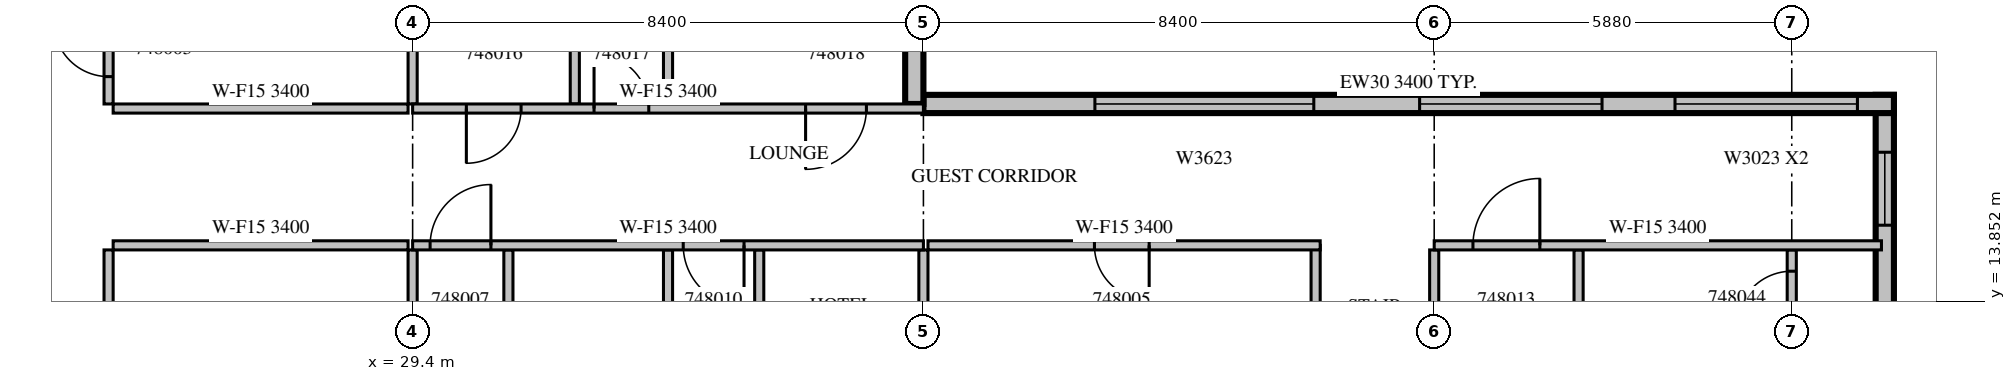
"""IFC4 building model, lengths in metres.
Left out: names, types, materials, properties, quantities, classifications, styles, units other than length and angle.
Written with IfcOpenShell. Run it as: python <this file> out.ifc"""

import sys

from ifc_helpers import new_model, si_unit, direction, frame, frame_2d, origin, place, context, subcontext, project, spatial, rectangle, extrude, source, transform, mapped, element, fill, save


model = new_model("IFC4")
c1 = context("Model", 3, precision=1e-05, world=origin(), true_north=direction((0.0, 1.0)))
c2 = subcontext(c1, "Body", "Model", "MODEL_VIEW")
j1 = project(units=[si_unit("LENGTHUNIT", "METRE"), si_unit("PLANEANGLEUNIT", "RADIAN")], contexts=[c1])
p1 = place(None, origin())
s1 = spatial("IfcSite", under=j1, at=p1, CompositionType="ELEMENT")
p2 = place(p1, origin())
s2 = spatial("IfcBuilding", under=s1, at=p2, CompositionType="ELEMENT")
p3 = place(p2, frame((0.0, 0.0, 215.8)))
s3 = spatial("IfcBuildingStorey", under=s2, at=p3, CompositionType="ELEMENT", Elevation=215.8)
m1 = source(origin(), c2, "Body", "SweptSolid", [
    extrude(rectangle(XDim=6.75, YDim=0.3, at=frame_2d((3.375, 0.0))), origin(), (0.0, 0.0, 1.0), 3.4),
])
p4 = place(p3, frame((53.61, 10.5, 0.0), z_axis=(0.0, 0.0, 1.0), x_axis=(0.0, 1.0, 0.0)))
e1 = element("IfcWall", 1, at=p4, inside=s3, PredefinedType="STANDARD", context=c2, shape_type="MappedRepresentation", body=[
    mapped(m1, transform((0.0, 0.0, 0.0), scale=1.0)),
])
m2 = source(origin(), c2, "Body", "SweptSolid", [
    extrude(rectangle(XDim=1.2, YDim=2.3, at=frame_2d((0.6, 1.15))), frame((0.0, 0.16, 0.0), z_axis=(0.0, -1.0, 0.0), x_axis=(1.0, 0.0, 0.0)), (0.0, 0.0, 1.0), 0.32),
])
p5 = place(p4, frame((1.087, 0.0, 0.6)))
e2 = element("IfcOpeningElement", 2, at=p5, cuts=e1, PredefinedType="OPENING", context=c2, shape_type="MappedRepresentation", body=[
    mapped(m2, transform((0.0, 0.0, 0.0), scale=1.0)),
])
p6 = place(p4, frame((4.606, 0.0, 0.6)))
e3 = element("IfcOpeningElement", 3, at=p6, cuts=e1, PredefinedType="OPENING", context=c2, shape_type="MappedRepresentation", body=[
    mapped(m2, transform((0.0, 0.0, 0.0), scale=1.0)),
])
p7 = place(p3, frame((53.76, 17.1, 0.0), z_axis=(0.0, 0.0, 1.0), x_axis=(-1.0, 0.0, 0.0)))
e4 = element("IfcWall", 4, at=p7, inside=s3, PredefinedType="STANDARD", context=c2, shape_type="SweptSolid", body=[
    extrude(rectangle(XDim=15.96, YDim=0.3, at=frame_2d((7.98, 0.0))), origin(), (0.0, 0.0, 1.0), 3.4),
])
m3 = source(origin(), c2, "Body", "SweptSolid", [
    extrude(rectangle(XDim=3.0, YDim=2.3, at=frame_2d((1.5, 1.15))), frame((0.0, 0.16, 0.0), z_axis=(0.0, -1.0, 0.0), x_axis=(1.0, 0.0, 0.0)), (0.0, 0.0, 1.0), 0.32),
])
p8 = place(p7, frame((0.6, 0.0, 0.6)))
e5 = element("IfcOpeningElement", 5, at=p8, cuts=e4, PredefinedType="OPENING", context=c2, shape_type="MappedRepresentation", body=[
    mapped(m3, transform((0.0, 0.0, 0.0), scale=1.0)),
])
p9 = place(p7, frame((4.8, 0.0, 0.6)))
e6 = element("IfcOpeningElement", 6, at=p9, cuts=e4, PredefinedType="OPENING", context=c2, shape_type="MappedRepresentation", body=[
    mapped(m3, transform((0.0, 0.0, 0.0), scale=1.0)),
])
m4 = source(origin(), c2, "Body", "SweptSolid", [
    extrude(rectangle(XDim=3.6, YDim=2.3, at=frame_2d((1.8, 1.15))), frame((0.0, 0.16, 0.0), z_axis=(0.0, -1.0, 0.0), x_axis=(1.0, 0.0, 0.0)), (0.0, 0.0, 1.0), 0.32),
])
p10 = place(p7, frame((9.54, 0.0, 0.6)))
e7 = element("IfcOpeningElement", 7, at=p10, cuts=e4, PredefinedType="OPENING", context=c2, shape_type="MappedRepresentation", body=[
    mapped(m4, transform((0.0, 0.0, 0.0), scale=1.0)),
])
m5 = source(origin(), c2, "Body", "SweptSolid", [
    extrude(rectangle(XDim=3.0, YDim=0.3, at=frame_2d((1.5, 0.0))), origin(), (0.0, 0.0, 1.0), 3.4),
])
p11 = place(p3, frame((37.65, 17.1, 0.0), z_axis=(0.0, 0.0, 1.0), x_axis=(0.0, 1.0, 0.0)))
e8 = element("IfcWall", 8, at=p11, inside=s3, PredefinedType="STANDARD", context=c2, shape_type="MappedRepresentation", body=[
    mapped(m5, transform((0.0, 0.0, 0.0), scale=1.0)),
])
p12 = place(p11, frame((1.425, 0.0, 0.6)))
e9 = element("IfcOpeningElement", 9, at=p12, cuts=e8, PredefinedType="OPENING", context=c2, shape_type="MappedRepresentation", body=[
    mapped(m2, transform((0.0, 0.0, 0.0), scale=1.0)),
])
m6 = source(origin(), c2, "Body", "SweptSolid", [
    extrude(rectangle(XDim=11.225, YDim=0.15, at=frame_2d((5.612, 0.0))), origin(), (0.0, 0.0, 1.0), 2.4),
])
p13 = place(p3, frame((24.4, 14.7, 0.0), z_axis=(0.0, 0.0, 1.0), x_axis=(0.0, -1.0, 0.0)))
e10 = element("IfcWall", 10, at=p13, inside=s3, PredefinedType="PARTITIONING", context=c2, shape_type="MappedRepresentation", body=[
    mapped(m6, transform((0.0, 0.0, 0.0), scale=1.0)),
])
m7 = source(origin(), c2, "Body", "SweptSolid", [
    extrude(rectangle(XDim=0.9, YDim=2.1, at=frame_2d((0.45, 1.05))), frame((0.0, 0.085, 0.0), z_axis=(0.0, -1.0, 0.0), x_axis=(1.0, 0.0, 0.0)), (0.0, 0.0, 1.0), 0.17),
])
p14 = place(p13, frame((9.062, 0.0, 0.0)))
e11 = element("IfcOpeningElement", 11, at=p14, cuts=e10, PredefinedType="OPENING", context=c2, shape_type="MappedRepresentation", body=[
    mapped(m7, transform((0.0, 0.0, 0.0), scale=1.0)),
])
p15 = place(p13, frame((2.575, 0.0, 0.0)))
e12 = element("IfcOpeningElement", 12, at=p15, cuts=e10, PredefinedType="OPENING", context=c2, shape_type="MappedRepresentation", body=[
    mapped(m7, transform((0.0, 0.0, 0.0), scale=1.0)),
])
m8 = source(origin(), c2, "Body", "SweptSolid", [
    extrude(rectangle(XDim=3.6, YDim=0.15, at=frame_2d((1.8, 0.0))), origin(), (0.0, 0.0, 1.0), 3.4),
])
p16 = place(p3, frame((24.4, 20.7, 0.0), z_axis=(0.0, 0.0, 1.0), x_axis=(0.0, -1.0, 0.0)))
e13 = element("IfcWall", 13, at=p16, inside=s3, PredefinedType="PARTITIONING", context=c2, shape_type="MappedRepresentation", body=[
    mapped(m8, transform((0.0, 0.0, 0.0), scale=1.0)),
])
p17 = place(p16, frame((2.25, 0.0, 0.0)))
e14 = element("IfcOpeningElement", 14, at=p17, cuts=e13, PredefinedType="OPENING", context=c2, shape_type="MappedRepresentation", body=[
    mapped(m7, transform((0.0, 0.0, 0.0), scale=1.0)),
])
m9 = source(origin(), c2, "Body", "SweptSolid", [
    extrude(rectangle(XDim=4.85, YDim=0.15, at=frame_2d((2.425, 0.0))), origin(), (0.0, 0.0, 1.0), 3.4),
])
for number, where, z_axis, x_axis in (
    (15, (29.325, 14.775, 0.0), (0.0, 0.0, 1.0), (-1.0, 0.0, 0.0)),
    (16, (24.475, 17.025, 0.0), (0.0, 0.0, 1.0), (1.0, 0.0, 0.0)),
):
    element("IfcWall", number, at=place(p3, frame(where, z_axis=z_axis, x_axis=x_axis)), inside=s3, PredefinedType="PARTITIONING", context=c2, shape_type="MappedRepresentation", body=[
        mapped(m9, transform((0.0, 0.0, 0.0), scale=1.0)),
    ])
m10 = source(origin(), c2, "Body", "SweptSolid", [
    extrude(rectangle(XDim=3.751, YDim=0.15, at=frame_2d((1.875, 0.0))), origin(), (0.0, 0.0, 1.0), 3.4),
])
p18 = place(p3, frame((29.4, 10.949, 0.0), z_axis=(0.0, 0.0, 1.0), x_axis=(0.0, 1.0, 0.0)))
e17 = element("IfcWall", 17, at=p18, inside=s3, PredefinedType="PARTITIONING", context=c2, shape_type="MappedRepresentation", body=[
    mapped(m10, transform((0.0, 0.0, 0.0), scale=1.0)),
])
m11 = source(origin(), c2, "Body", "SweptSolid", [
    extrude(rectangle(XDim=3.001, YDim=0.15, at=frame_2d((1.5, 0.0))), origin(), (0.0, 0.0, 1.0), 3.4),
])
p19 = place(p3, frame((29.4, 17.1, 0.0), z_axis=(0.0, 0.0, 1.0), x_axis=(0.0, 1.0, 0.0)))
e18 = element("IfcWall", 18, at=p19, inside=s3, PredefinedType="PARTITIONING", context=c2, shape_type="MappedRepresentation", body=[
    mapped(m11, transform((0.0, 0.0, 0.0), scale=1.0)),
])
p20 = place(p3, frame((44.25, 11.5, 0.0), z_axis=(0.0, 0.0, 1.0), x_axis=(0.0, 1.0, 0.0)))
e19 = element("IfcWall", 19, at=p20, inside=s3, PredefinedType="PARTITIONING", context=c2, shape_type="SweptSolid", body=[
    extrude(rectangle(XDim=3.275, YDim=0.15, at=frame_2d((1.637, 0.0))), origin(), (0.0, 0.0, 1.0), 3.4),
])
m12 = source(origin(), c2, "Body", "SweptSolid", [
    extrude(rectangle(XDim=6.45, YDim=0.15, at=frame_2d((3.225, 0.0))), origin(), (0.0, 0.0, 1.0), 3.4),
])
p21 = place(p3, frame((44.325, 14.775, 0.0), z_axis=(0.0, 0.0, 1.0), x_axis=(-1.0, 0.0, 0.0)))
e20 = element("IfcWall", 20, at=p21, inside=s3, PredefinedType="PARTITIONING", context=c2, shape_type="MappedRepresentation", body=[
    mapped(m12, transform((0.0, 0.0, 0.0), scale=1.0)),
])
p22 = place(p21, frame((2.812, 0.0, 0.0)))
e21 = element("IfcOpeningElement", 21, at=p22, cuts=e20, PredefinedType="OPENING", context=c2, shape_type="MappedRepresentation", body=[
    mapped(m7, transform((0.0, 0.0, 0.0), scale=1.0)),
])
for number, where, z_axis, x_axis in (
    (22, (30.975, 11.1, 0.0), (0.0, 0.0, 1.0), (0.0, 1.0, 0.0)),
    (23, (33.6, 11.1, 0.0), (0.0, 0.0, 1.0), (0.0, 1.0, 0.0)),
    (24, (35.1, 11.1, 0.0), (0.0, 0.0, 1.0), (0.0, 1.0, 0.0)),
    (25, (37.8, 11.1, 0.0), (0.0, 0.0, 1.0), (0.0, 1.0, 0.0)),
    (26, (48.574, 11.1, 0.0), (0.0, 0.0, 1.0), (0.0, 1.0, 0.0)),
):
    element("IfcWall", number, at=place(p3, frame(where, z_axis=z_axis, x_axis=x_axis)), inside=s3, PredefinedType="PARTITIONING", context=c2, shape_type="MappedRepresentation", body=[
        mapped(m8, transform((0.0, 0.0, 0.0), scale=1.0)),
    ])
p23 = place(p3, frame((52.08, 11.1, 0.0), z_axis=(0.0, 0.0, 1.0), x_axis=(0.0, 1.0, 0.0)))
e27 = element("IfcWall", 27, at=p23, inside=s3, PredefinedType="PARTITIONING", context=c2, shape_type="MappedRepresentation", body=[
    mapped(m8, transform((0.0, 0.0, 0.0), scale=1.0)),
])
p24 = place(p23, frame((1.35, 0.0, 0.0)))
e28 = element("IfcOpeningElement", 28, at=p24, cuts=e27, PredefinedType="OPENING", context=c2, shape_type="MappedRepresentation", body=[
    mapped(m7, transform((0.0, 0.0, 0.0), scale=1.0)),
])
p25 = place(p23, frame((2.35, 0.0, 0.0)))
e29 = element("IfcOpeningElement", 29, at=p25, cuts=e27, PredefinedType="OPENING", context=c2, shape_type="MappedRepresentation", body=[
    mapped(m7, transform((0.0, 0.0, 0.0), scale=1.0)),
])
p26 = place(p23, frame((0.35, 0.0, 0.0)))
e30 = element("IfcOpeningElement", 30, at=p26, cuts=e27, PredefinedType="OPENING", context=c2, shape_type="MappedRepresentation", body=[
    mapped(m7, transform((0.0, 0.0, 0.0), scale=1.0)),
])
for number, where, z_axis, x_axis in (
    (31, (46.2, 11.1, 0.0), (0.0, 0.0, 1.0), (0.0, 1.0, 0.0)),
    (32, (32.067, 20.7, 0.0), (0.0, 0.0, 1.0), (0.0, -1.0, 0.0)),
    (33, (33.6, 17.1, 0.0), (0.0, 0.0, 1.0), (0.0, 1.0, 0.0)),
):
    element("IfcWall", number, at=place(p3, frame(where, z_axis=z_axis, x_axis=x_axis)), inside=s3, PredefinedType="PARTITIONING", context=c2, shape_type="MappedRepresentation", body=[
        mapped(m8, transform((0.0, 0.0, 0.0), scale=1.0)),
    ])
m13 = source(origin(), c2, "Body", "SweptSolid", [
    extrude(rectangle(XDim=8.4, YDim=0.15, at=frame_2d((4.2, 0.0))), origin(), (0.0, 0.0, 1.0), 3.4),
])
p27 = place(p3, frame((37.8, 14.775, 0.0), z_axis=(0.0, 0.0, 1.0), x_axis=(-1.0, 0.0, 0.0)))
e34 = element("IfcWall", 34, at=p27, inside=s3, PredefinedType="PARTITIONING", context=c2, shape_type="MappedRepresentation", body=[
    mapped(m13, transform((0.0, 0.0, 0.0), scale=1.0)),
])
m14 = source(origin(), c2, "Body", "SweptSolid", [
    extrude(rectangle(XDim=1.0, YDim=2.1, at=frame_2d((0.5, 1.05))), frame((0.0, 0.085, 0.0), z_axis=(0.0, -1.0, 0.0), x_axis=(1.0, 0.0, 0.0)), (0.0, 0.0, 1.0), 0.17),
])
p28 = place(p27, frame((7.112, 0.0, 0.0)))
e35 = element("IfcOpeningElement", 35, at=p28, cuts=e34, PredefinedType="OPENING", context=c2, shape_type="MappedRepresentation", body=[
    mapped(m14, transform((0.0, 0.0, 0.0), scale=1.0)),
])
p29 = place(p27, frame((2.95, 0.0, 0.0)))
e36 = element("IfcOpeningElement", 36, at=p29, cuts=e34, PredefinedType="OPENING", context=c2, shape_type="MappedRepresentation", body=[
    mapped(m14, transform((0.0, 0.0, 0.0), scale=1.0)),
])
m15 = source(origin(), c2, "Body", "SweptSolid", [
    extrude(rectangle(XDim=7.355, YDim=0.15, at=frame_2d((3.678, 0.0))), origin(), (0.0, 0.0, 1.0), 3.4),
])
p30 = place(p3, frame((53.555, 14.775, 0.0), z_axis=(0.0, 0.0, 1.0), x_axis=(-1.0, 0.0, 0.0)))
e37 = element("IfcWall", 37, at=p30, inside=s3, PredefinedType="PARTITIONING", context=c2, shape_type="MappedRepresentation", body=[
    mapped(m15, transform((0.0, 0.0, 0.0), scale=1.0)),
])
m16 = source(origin(), c2, "Body", "SweptSolid", [
    extrude(rectangle(XDim=1.1, YDim=2.1, at=frame_2d((0.55, 1.05))), frame((0.0, 0.085, 0.0), z_axis=(0.0, -1.0, 0.0), x_axis=(1.0, 0.0, 0.0)), (0.0, 0.0, 1.0), 0.17),
])
p31 = place(p30, frame((5.618, 0.0, 0.0)))
e38 = element("IfcOpeningElement", 38, at=p31, cuts=e37, PredefinedType="OPENING", context=c2, shape_type="MappedRepresentation", body=[
    mapped(m16, transform((0.0, 0.0, 0.0), scale=1.0)),
])
p32 = place(p3, frame((29.4, 17.025, 0.0), z_axis=(0.0, 0.0, 1.0), x_axis=(1.0, 0.0, 0.0)))
e39 = element("IfcWall", 39, at=p32, inside=s3, PredefinedType="PARTITIONING", context=c2, shape_type="MappedRepresentation", body=[
    mapped(m13, transform((0.0, 0.0, 0.0), scale=1.0)),
])
p33 = place(p32, frame((0.883, 0.0, 0.0)))
e40 = element("IfcOpeningElement", 40, at=p33, cuts=e39, PredefinedType="OPENING", context=c2, shape_type="MappedRepresentation", body=[
    mapped(m7, transform((0.0, 0.0, 0.0), scale=1.0)),
])
p34 = place(p32, frame((2.983, 0.0, 0.0)))
e41 = element("IfcOpeningElement", 41, at=p34, cuts=e39, PredefinedType="OPENING", context=c2, shape_type="MappedRepresentation", body=[
    mapped(m7, transform((0.0, 0.0, 0.0), scale=1.0)),
])
p35 = place(p32, frame((6.463, 0.0, 0.0)))
e42 = element("IfcOpeningElement", 42, at=p35, cuts=e39, PredefinedType="OPENING", context=c2, shape_type="MappedRepresentation", body=[
    mapped(m14, transform((0.0, 0.0, 0.0), scale=1.0)),
])
m17 = source(origin(), c2, "Body", "SweptSolid", [
    extrude(rectangle(XDim=1.2, YDim=2.3, at=frame_2d((0.6, 1.15))), frame((0.0, 0.03, 0.0), z_axis=(0.0, -1.0, 0.0), x_axis=(1.0, 0.0, 0.0)), (0.0, 0.0, 1.0), 0.06),
])
p36 = place(p6, origin())
e43 = element("IfcWindow", 43, at=p36, inside=s3, PartitioningType="SINGLE_PANEL", PredefinedType="WINDOW", context=c2, shape_type="MappedRepresentation", body=[
    mapped(m17, transform((0.0, 0.0, 0.0), scale=1.0)),
])
fill(e3, e43)
m18 = source(origin(), c2, "Body", "SweptSolid", [
    extrude(rectangle(XDim=3.0, YDim=2.3, at=frame_2d((1.5, 1.15))), frame((0.0, 0.03, 0.0), z_axis=(0.0, -1.0, 0.0), x_axis=(1.0, 0.0, 0.0)), (0.0, 0.0, 1.0), 0.06),
])
p37 = place(p8, origin())
e44 = element("IfcWindow", 44, at=p37, inside=s3, PartitioningType="SINGLE_PANEL", PredefinedType="WINDOW", context=c2, shape_type="MappedRepresentation", body=[
    mapped(m18, transform((0.0, 0.0, 0.0), scale=1.0)),
])
fill(e5, e44)
p38 = place(p9, origin())
e45 = element("IfcWindow", 45, at=p38, inside=s3, PartitioningType="SINGLE_PANEL", PredefinedType="WINDOW", context=c2, shape_type="MappedRepresentation", body=[
    mapped(m18, transform((0.0, 0.0, 0.0), scale=1.0)),
])
fill(e6, e45)
m19 = source(origin(), c2, "Body", "SweptSolid", [
    extrude(rectangle(XDim=3.6, YDim=2.3, at=frame_2d((1.8, 1.15))), frame((0.0, 0.03, 0.0), z_axis=(0.0, -1.0, 0.0), x_axis=(1.0, 0.0, 0.0)), (0.0, 0.0, 1.0), 0.06),
])
p39 = place(p10, origin())
e46 = element("IfcWindow", 46, at=p39, inside=s3, PartitioningType="SINGLE_PANEL", PredefinedType="WINDOW", context=c2, shape_type="MappedRepresentation", body=[
    mapped(m19, transform((0.0, 0.0, 0.0), scale=1.0)),
])
fill(e7, e46)
m20 = source(origin(), c2, "Body", "SweptSolid", [
    extrude(rectangle(XDim=0.9, YDim=2.1, at=frame_2d((0.45, 1.05))), frame((0.0, 0.025, 0.0), z_axis=(0.0, -1.0, 0.0), x_axis=(1.0, 0.0, 0.0)), (0.0, 0.0, 1.0), 0.05),
])
p40 = place(p17, origin())
e47 = element("IfcDoor", 47, at=p40, inside=s3, OperationType="SINGLE_SWING_RIGHT", PredefinedType="DOOR", context=c2, shape_type="MappedRepresentation", body=[
    mapped(m20, transform((0.0, 0.0, 0.0), scale=1.0)),
])
fill(e14, e47)
p41 = place(p22, origin())
e48 = element("IfcDoor", 48, at=p41, inside=s3, OperationType="SINGLE_SWING_LEFT", PredefinedType="DOOR", context=c2, shape_type="MappedRepresentation", body=[
    mapped(m20, transform((0.0, 0.0, 0.0), scale=1.0)),
])
fill(e21, e48)
m21 = source(origin(), c2, "Body", "SweptSolid", [
    extrude(rectangle(XDim=1.0, YDim=2.1, at=frame_2d((0.5, 1.05))), frame((0.0, 0.025, 0.0), z_axis=(0.0, -1.0, 0.0), x_axis=(1.0, 0.0, 0.0)), (0.0, 0.0, 1.0), 0.05),
])
p42 = place(p28, origin())
e49 = element("IfcDoor", 49, at=p42, inside=s3, OperationType="SINGLE_SWING_RIGHT", PredefinedType="DOOR", context=c2, shape_type="MappedRepresentation", body=[
    mapped(m21, transform((0.0, 0.0, 0.0), scale=1.0)),
])
fill(e35, e49)
p43 = place(p29, origin())
e50 = element("IfcDoor", 50, at=p43, inside=s3, OperationType="SINGLE_SWING_LEFT", PredefinedType="DOOR", context=c2, shape_type="MappedRepresentation", body=[
    mapped(m21, transform((0.0, 0.0, 0.0), scale=1.0)),
])
fill(e36, e50)
m22 = source(origin(), c2, "Body", "SweptSolid", [
    extrude(rectangle(XDim=1.1, YDim=2.1, at=frame_2d((0.55, 1.05))), frame((0.0, 0.025, 0.0), z_axis=(0.0, -1.0, 0.0), x_axis=(1.0, 0.0, 0.0)), (0.0, 0.0, 1.0), 0.05),
])
p44 = place(p31, origin())
e51 = element("IfcDoor", 51, at=p44, inside=s3, OperationType="SINGLE_SWING_RIGHT", PredefinedType="DOOR", context=c2, shape_type="MappedRepresentation", body=[
    mapped(m22, transform((0.0, 0.0, 0.0), scale=1.0)),
])
fill(e38, e51)
p45 = place(p33, origin())
e52 = element("IfcDoor", 52, at=p45, inside=s3, OperationType="SINGLE_SWING_RIGHT", PredefinedType="DOOR", context=c2, shape_type="MappedRepresentation", body=[
    mapped(m20, transform((0.0, 0.0, 0.0), scale=1.0)),
])
fill(e40, e52)
p46 = place(p34, origin())
e53 = element("IfcDoor", 53, at=p46, inside=s3, OperationType="SINGLE_SWING_LEFT", PredefinedType="DOOR", context=c2, shape_type="MappedRepresentation", body=[
    mapped(m20, transform((0.0, 0.0, 0.0), scale=1.0)),
])
fill(e41, e53)
p47 = place(p35, origin())
e54 = element("IfcDoor", 54, at=p47, inside=s3, OperationType="SINGLE_SWING_RIGHT", PredefinedType="DOOR", context=c2, shape_type="MappedRepresentation", body=[
    mapped(m21, transform((0.0, 0.0, 0.0), scale=1.0)),
])
fill(e42, e54)
p48 = place(p25, origin())
e55 = element("IfcDoor", 55, at=p48, inside=s3, OperationType="SINGLE_SWING_LEFT", PredefinedType="DOOR", context=c2, shape_type="MappedRepresentation", body=[
    mapped(m20, transform((0.0, 0.0, 0.0), scale=1.0)),
])
fill(e29, e55)
save(model, sys.argv[1])
